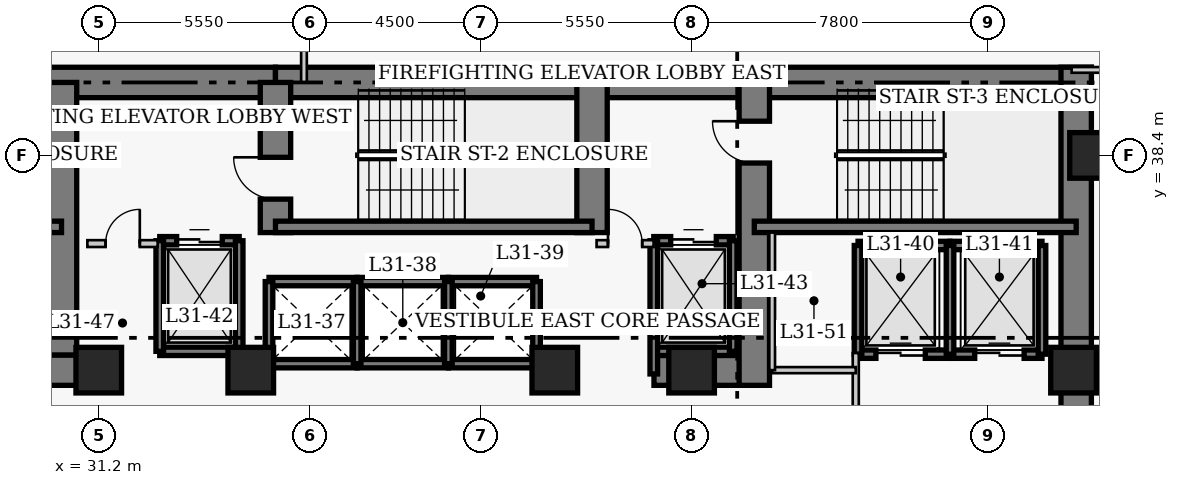
"""IFC4 building model, lengths in metres.
Left out: names, types, materials, properties, quantities, classifications, styles, units other than length and angle.
Written with IfcOpenShell. Run it as: python <this file> out.ifc"""

import sys

from ifc_helpers import new_model, si_unit, direction, frame, frame_2d, origin, origin_2d, place, context, subcontext, project, spatial, rectangle, extrude, element, fill, save


model = new_model("IFC4")
c1 = context("Model", 3, precision=1e-05, world=origin(), true_north=direction((0.0, 1.0)))
c2 = subcontext(c1, "Body", "Model", "MODEL_VIEW")
j1 = project(units=[si_unit("LENGTHUNIT", "METRE"), si_unit("PLANEANGLEUNIT", "RADIAN")], contexts=[c1])
p1 = place(None, origin())
s1 = spatial("IfcSite", under=j1, at=p1, CompositionType="ELEMENT")
p2 = place(p1, origin())
s2 = spatial("IfcBuilding", under=s1, at=p2, CompositionType="ELEMENT")
p3 = place(p2, frame((0.0, 0.0, 126.0)))
s3 = spatial("IfcBuildingStorey", under=s2, at=p3, CompositionType="ELEMENT", Elevation=126.0)
p4 = place(p3, frame((21.5, 40.32, 0.0), z_axis=(0.0, 0.0, 1.0), x_axis=(1.0, 0.0, 0.0)))
e1 = element("IfcWall", 1, at=p4, inside=s3, PredefinedType="SHEAR", context=c2, shape_type="SweptSolid", body=[
    extrude(rectangle(XDim=14.35, YDim=0.8, at=frame_2d((7.175, 0.0))), origin(), (0.0, 0.0, 1.0), 3.8),
])
p5 = place(p3, frame((35.85, 40.32, 0.0), z_axis=(0.0, 0.0, 1.0), x_axis=(1.0, 0.0, 0.0)))
e2 = element("IfcWall", 2, at=p5, inside=s3, PredefinedType="SHEAR", context=c2, shape_type="SweptSolid", body=[
    extrude(rectangle(XDim=12.6, YDim=0.8, at=frame_2d((6.3, 0.0))), origin(), (0.0, 0.0, 1.0), 3.8),
])
p6 = place(p3, frame((48.45, 40.32, 0.0), z_axis=(0.0, 0.0, 1.0), x_axis=(1.0, 0.0, 0.0)))
e3 = element("IfcWall", 3, at=p6, inside=s3, PredefinedType="SHEAR", context=c2, shape_type="SweptSolid", body=[
    extrude(rectangle(XDim=8.87, YDim=0.8, at=frame_2d((4.435, 0.0))), origin(), (0.0, 0.0, 1.0), 3.8),
])
p7 = place(p3, frame((56.92, 27.05, 0.0), z_axis=(0.0, 0.0, 1.0), x_axis=(0.0, 1.0, 0.0)))
e4 = element("IfcWall", 4, at=p7, inside=s3, PredefinedType="SHEAR", context=c2, shape_type="SweptSolid", body=[
    extrude(rectangle(XDim=13.67, YDim=0.8, at=frame_2d((6.835, 0.0))), origin(), (0.0, 0.0, 1.0), 3.8),
])
p8 = place(p3, frame((28.45, 32.75, 0.0), z_axis=(0.0, 0.0, 1.0), x_axis=(1.0, 0.0, 0.0)))
e5 = element("IfcWall", 5, at=p8, inside=s3, PredefinedType="SHEAR", context=c2, shape_type="SweptSolid", body=[
    extrude(rectangle(XDim=2.4, YDim=0.8, at=frame_2d((1.2, 0.0))), origin(), (0.0, 0.0, 1.0), 3.8),
])
p9 = place(p3, frame((45.81, 32.75, 0.0), z_axis=(0.0, 0.0, 1.0), x_axis=(1.0, 0.0, 0.0)))
e6 = element("IfcWall", 6, at=p9, inside=s3, PredefinedType="SHEAR", context=c2, shape_type="SweptSolid", body=[
    extrude(rectangle(XDim=2.64, YDim=0.8, at=frame_2d((1.32, 0.0))), origin(), (0.0, 0.0, 1.0), 3.8),
])
p10 = place(p3, frame((30.22, 33.15, 0.0), z_axis=(0.0, 0.0, 1.0), x_axis=(0.0, 1.0, 0.0)))
e7 = element("IfcWall", 7, at=p10, inside=s3, PredefinedType="SHEAR", context=c2, shape_type="SweptSolid", body=[
    extrude(rectangle(XDim=7.17, YDim=0.8, at=frame_2d((3.585, 0.0))), origin(), (0.0, 0.0, 1.0), 3.8),
])
p11 = place(p3, frame((35.85, 36.37, 0.0), z_axis=(0.0, 0.0, 1.0), x_axis=(0.0, 1.0, 0.0)))
e8 = element("IfcWall", 8, at=p11, inside=s3, PredefinedType="SHEAR", context=c2, shape_type="SweptSolid", body=[
    extrude(rectangle(XDim=3.95, YDim=0.8, at=frame_2d((1.975, 0.0))), origin(), (0.0, 0.0, 1.0), 3.8),
])
p12 = place(p11, frame((0.88, 0.0, 0.0)))
e9 = element("IfcOpeningElement", 9, at=p12, cuts=e8, PredefinedType="OPENING", context=c2, shape_type="SweptSolid", body=[
    extrude(rectangle(XDim=1.1, YDim=2.15, at=frame_2d((0.55, 1.075))), frame((0.0, 0.41, 0.0), z_axis=(0.0, -1.0, 0.0), x_axis=(1.0, 0.0, 0.0)), (0.0, 0.0, 1.0), 0.82),
])
p13 = place(p3, frame((44.18, 36.37, 0.0), z_axis=(0.0, 0.0, 1.0), x_axis=(0.0, 1.0, 0.0)))
e10 = element("IfcWall", 10, at=p13, inside=s3, PredefinedType="SHEAR", context=c2, shape_type="SweptSolid", body=[
    extrude(rectangle(XDim=3.95, YDim=0.8, at=frame_2d((1.975, 0.0))), origin(), (0.0, 0.0, 1.0), 3.8),
])
p14 = place(p3, frame((48.45, 32.35, 0.0), z_axis=(0.0, 0.0, 1.0), x_axis=(0.0, 1.0, 0.0)))
e11 = element("IfcWall", 11, at=p14, inside=s3, PredefinedType="SHEAR", context=c2, shape_type="SweptSolid", body=[
    extrude(rectangle(XDim=7.97, YDim=0.8, at=frame_2d((3.985, 0.0))), origin(), (0.0, 0.0, 1.0), 3.8),
])
p15 = place(p14, frame((5.85, 0.0, 0.0)))
e12 = element("IfcOpeningElement", 12, at=p15, cuts=e11, PredefinedType="OPENING", context=c2, shape_type="SweptSolid", body=[
    extrude(rectangle(XDim=1.1, YDim=2.15, at=frame_2d((0.55, 1.075))), frame((0.0, 0.41, 0.0), z_axis=(0.0, -1.0, 0.0), x_axis=(1.0, 0.0, 0.0)), (0.0, 0.0, 1.0), 0.82),
])
p16 = place(p3, frame((21.9, 36.52, 0.0), z_axis=(0.0, 0.0, 1.0), x_axis=(1.0, 0.0, 0.0)))
e13 = element("IfcWall", 13, at=p16, inside=s3, PredefinedType="SHEAR", context=c2, shape_type="SweptSolid", body=[
    extrude(rectangle(XDim=8.32, YDim=0.3, at=frame_2d((4.16, 0.0))), origin(), (0.0, 0.0, 1.0), 3.8),
])
p17 = place(p16, frame((0.9, 0.0, 0.0)))
e14 = element("IfcOpeningElement", 14, at=p17, cuts=e13, PredefinedType="OPENING", context=c2, shape_type="SweptSolid", body=[
    extrude(rectangle(XDim=1.1, YDim=2.15, at=frame_2d((0.55, 1.075))), frame((0.0, 0.16, 0.0), z_axis=(0.0, -1.0, 0.0), x_axis=(1.0, 0.0, 0.0)), (0.0, 0.0, 1.0), 0.32),
])
p18 = place(p3, frame((35.85, 36.52, 0.0), z_axis=(0.0, 0.0, 1.0), x_axis=(1.0, 0.0, 0.0)))
e15 = element("IfcWall", 15, at=p18, inside=s3, PredefinedType="SHEAR", context=c2, shape_type="SweptSolid", body=[
    extrude(rectangle(XDim=8.33, YDim=0.3, at=frame_2d((4.165, 0.0))), origin(), (0.0, 0.0, 1.0), 3.8),
])
p19 = place(p3, frame((48.45, 36.52, 0.0), z_axis=(0.0, 0.0, 1.0), x_axis=(1.0, 0.0, 0.0)))
e16 = element("IfcWall", 16, at=p19, inside=s3, PredefinedType="SHEAR", context=c2, shape_type="SweptSolid", body=[
    extrude(rectangle(XDim=8.47, YDim=0.3, at=frame_2d((4.235, 0.0))), origin(), (0.0, 0.0, 1.0), 3.8),
])
for number, where, z_axis, x_axis in (
    (17, (57.35, 38.4, 0.0), (0.0, 0.0, 1.0), (1.0, 0.0, 0.0)),
    (18, (31.2, 32.75, 0.0), (0.0, 0.0, 1.0), (1.0, 0.0, 0.0)),
    (19, (35.2, 32.75, 0.0), (0.0, 0.0, 1.0), (1.0, 0.0, 0.0)),
    (20, (43.2, 32.75, 0.0), (0.0, 0.0, 1.0), (1.0, 0.0, 0.0)),
    (21, (46.8, 32.75, 0.0), (0.0, 0.0, 1.0), (1.0, 0.0, 0.0)),
    (22, (56.85, 32.75, 0.0), (0.0, 0.0, 1.0), (1.0, 0.0, 0.0)),
):
    element("IfcColumn", number, at=place(p3, frame(where, z_axis=z_axis, x_axis=x_axis)), inside=s3, PredefinedType="COLUMN", context=c2, shape_type="SweptSolid", body=[
        extrude(rectangle(XDim=1.2, YDim=1.2, at=origin_2d()), origin(), (0.0, 0.0, 1.0), 3.8),
    ])
for number, where, z_axis, x_axis in (
    (23, (35.68, 35.08, 0.0), (0.0, 0.0, 1.0), (1.0, 0.0, 0.0)),
    (24, (35.68, 32.92, 0.0), (0.0, 0.0, 1.0), (1.0, 0.0, 0.0)),
):
    element("IfcWall", number, at=place(p3, frame(where, z_axis=z_axis, x_axis=x_axis)), inside=s3, PredefinedType="SHEAR", context=c2, shape_type="SweptSolid", body=[
        extrude(rectangle(XDim=2.32, YDim=0.22, at=frame_2d((1.16, 0.0))), origin(), (0.0, 0.0, 1.0), 3.8),
    ])
p20 = place(p3, frame((35.68, 32.92, 0.0), z_axis=(0.0, 0.0, 1.0), x_axis=(0.0, 1.0, 0.0)))
e25 = element("IfcWall", 25, at=p20, inside=s3, PredefinedType="SHEAR", context=c2, shape_type="SweptSolid", body=[
    extrude(rectangle(XDim=2.16, YDim=0.2, at=frame_2d((1.08, 0.0))), origin(), (0.0, 0.0, 1.0), 3.8),
])
for number, where, z_axis, x_axis in (
    (26, (38.0, 35.08, 0.0), (0.0, 0.0, 1.0), (1.0, 0.0, 0.0)),
    (27, (38.0, 32.92, 0.0), (0.0, 0.0, 1.0), (1.0, 0.0, 0.0)),
):
    element("IfcWall", number, at=place(p3, frame(where, z_axis=z_axis, x_axis=x_axis)), inside=s3, PredefinedType="SHEAR", context=c2, shape_type="SweptSolid", body=[
        extrude(rectangle(XDim=2.4, YDim=0.22, at=frame_2d((1.2, 0.0))), origin(), (0.0, 0.0, 1.0), 3.8),
    ])
p21 = place(p3, frame((38.0, 32.92, 0.0), z_axis=(0.0, 0.0, 1.0), x_axis=(0.0, 1.0, 0.0)))
e28 = element("IfcWall", 28, at=p21, inside=s3, PredefinedType="SHEAR", context=c2, shape_type="SweptSolid", body=[
    extrude(rectangle(XDim=2.16, YDim=0.2, at=frame_2d((1.08, 0.0))), origin(), (0.0, 0.0, 1.0), 3.8),
])
for number, where, z_axis, x_axis in (
    (29, (40.4, 35.08, 0.0), (0.0, 0.0, 1.0), (1.0, 0.0, 0.0)),
    (30, (40.4, 32.92, 0.0), (0.0, 0.0, 1.0), (1.0, 0.0, 0.0)),
):
    element("IfcWall", number, at=place(p3, frame(where, z_axis=z_axis, x_axis=x_axis)), inside=s3, PredefinedType="SHEAR", context=c2, shape_type="SweptSolid", body=[
        extrude(rectangle(XDim=2.32, YDim=0.22, at=frame_2d((1.16, 0.0))), origin(), (0.0, 0.0, 1.0), 3.8),
    ])
for number, where, z_axis, x_axis in (
    (31, (40.4, 32.92, 0.0), (0.0, 0.0, 1.0), (0.0, 1.0, 0.0)),
    (32, (42.72, 32.92, 0.0), (0.0, 0.0, 1.0), (0.0, 1.0, 0.0)),
):
    element("IfcWall", number, at=place(p3, frame(where, z_axis=z_axis, x_axis=x_axis)), inside=s3, PredefinedType="SHEAR", context=c2, shape_type="SweptSolid", body=[
        extrude(rectangle(XDim=2.16, YDim=0.2, at=frame_2d((1.08, 0.0))), origin(), (0.0, 0.0, 1.0), 3.8),
    ])
p22 = place(p3, frame((51.18, 36.03, 0.0), z_axis=(0.0, 0.0, 1.0), x_axis=(1.0, 0.0, 0.0)))
e33 = element("IfcWall", 33, at=p22, inside=s3, PredefinedType="SHEAR", context=c2, shape_type="SweptSolid", body=[
    extrude(rectangle(XDim=2.42, YDim=0.22, at=frame_2d((1.21, 0.0))), origin(), (0.0, 0.0, 1.0), 3.8),
])
p23 = place(p3, frame((51.18, 33.17, 0.0), z_axis=(0.0, 0.0, 1.0), x_axis=(1.0, 0.0, 0.0)))
e34 = element("IfcWall", 34, at=p23, inside=s3, PredefinedType="SHEAR", context=c2, shape_type="SweptSolid", body=[
    extrude(rectangle(XDim=2.42, YDim=0.22, at=frame_2d((1.21, 0.0))), origin(), (0.0, 0.0, 1.0), 3.8),
])
p24 = place(p23, frame((0.47, 0.0, 0.0)))
e35 = element("IfcOpeningElement", 35, at=p24, cuts=e34, PredefinedType="OPENING", context=c2, shape_type="SweptSolid", body=[
    extrude(rectangle(XDim=1.3, YDim=2.15, at=frame_2d((0.65, 1.075))), frame((0.0, 0.12, 0.0), z_axis=(0.0, -1.0, 0.0), x_axis=(1.0, 0.0, 0.0)), (0.0, 0.0, 1.0), 0.24),
])
p25 = place(p3, frame((51.18, 33.17, 0.0), z_axis=(0.0, 0.0, 1.0), x_axis=(0.0, 1.0, 0.0)))
e36 = element("IfcWall", 36, at=p25, inside=s3, PredefinedType="SHEAR", context=c2, shape_type="SweptSolid", body=[
    extrude(rectangle(XDim=2.86, YDim=0.2, at=frame_2d((1.43, 0.0))), origin(), (0.0, 0.0, 1.0), 3.8),
])
p26 = place(p3, frame((53.6, 36.03, 0.0), z_axis=(0.0, 0.0, 1.0), x_axis=(1.0, 0.0, 0.0)))
e37 = element("IfcWall", 37, at=p26, inside=s3, PredefinedType="SHEAR", context=c2, shape_type="SweptSolid", body=[
    extrude(rectangle(XDim=2.42, YDim=0.22, at=frame_2d((1.21, 0.0))), origin(), (0.0, 0.0, 1.0), 3.8),
])
p27 = place(p3, frame((53.6, 33.17, 0.0), z_axis=(0.0, 0.0, 1.0), x_axis=(1.0, 0.0, 0.0)))
e38 = element("IfcWall", 38, at=p27, inside=s3, PredefinedType="SHEAR", context=c2, shape_type="SweptSolid", body=[
    extrude(rectangle(XDim=2.42, YDim=0.22, at=frame_2d((1.21, 0.0))), origin(), (0.0, 0.0, 1.0), 3.8),
])
p28 = place(p27, frame((0.65, 0.0, 0.0)))
e39 = element("IfcOpeningElement", 39, at=p28, cuts=e38, PredefinedType="OPENING", context=c2, shape_type="SweptSolid", body=[
    extrude(rectangle(XDim=1.3, YDim=2.15, at=frame_2d((0.65, 1.075))), frame((0.0, 0.12, 0.0), z_axis=(0.0, -1.0, 0.0), x_axis=(1.0, 0.0, 0.0)), (0.0, 0.0, 1.0), 0.24),
])
for number, where, z_axis, x_axis in (
    (40, (53.6, 33.17, 0.0), (0.0, 0.0, 1.0), (0.0, 1.0, 0.0)),
    (41, (56.02, 33.17, 0.0), (0.0, 0.0, 1.0), (0.0, 1.0, 0.0)),
):
    element("IfcWall", number, at=place(p3, frame(where, z_axis=z_axis, x_axis=x_axis)), inside=s3, PredefinedType="SHEAR", context=c2, shape_type="SweptSolid", body=[
        extrude(rectangle(XDim=2.86, YDim=0.2, at=frame_2d((1.43, 0.0))), origin(), (0.0, 0.0, 1.0), 3.8),
    ])
p29 = place(p3, frame((32.805, 36.155, 0.0), z_axis=(0.0, 0.0, 1.0), x_axis=(1.0, 0.0, 0.0)))
e42 = element("IfcWall", 42, at=p29, inside=s3, PredefinedType="SHEAR", context=c2, shape_type="SweptSolid", body=[
    extrude(rectangle(XDim=2.09, YDim=0.22, at=frame_2d((1.045, 0.0))), origin(), (0.0, 0.0, 1.0), 3.8),
])
p30 = place(p29, frame((0.445, 0.0, 0.0)))
e43 = element("IfcOpeningElement", 43, at=p30, cuts=e42, PredefinedType="OPENING", context=c2, shape_type="SweptSolid", body=[
    extrude(rectangle(XDim=1.2, YDim=2.15, at=frame_2d((0.6, 1.075))), frame((0.0, 0.12, 0.0), z_axis=(0.0, -1.0, 0.0), x_axis=(1.0, 0.0, 0.0)), (0.0, 0.0, 1.0), 0.24),
])
p31 = place(p3, frame((32.805, 33.245, 0.0), z_axis=(0.0, 0.0, 1.0), x_axis=(1.0, 0.0, 0.0)))
e44 = element("IfcWall", 44, at=p31, inside=s3, PredefinedType="SHEAR", context=c2, shape_type="SweptSolid", body=[
    extrude(rectangle(XDim=2.09, YDim=0.22, at=frame_2d((1.045, 0.0))), origin(), (0.0, 0.0, 1.0), 3.8),
])
for number, where, z_axis, x_axis in (
    (45, (32.805, 33.245, 0.0), (0.0, 0.0, 1.0), (0.0, 1.0, 0.0)),
    (46, (34.895, 33.245, 0.0), (0.0, 0.0, 1.0), (0.0, 1.0, 0.0)),
):
    element("IfcWall", number, at=place(p3, frame(where, z_axis=z_axis, x_axis=x_axis)), inside=s3, PredefinedType="SHEAR", context=c2, shape_type="SweptSolid", body=[
        extrude(rectangle(XDim=2.91, YDim=0.2, at=frame_2d((1.455, 0.0))), origin(), (0.0, 0.0, 1.0), 3.8),
    ])
p32 = place(p3, frame((45.805, 36.155, 0.0), z_axis=(0.0, 0.0, 1.0), x_axis=(1.0, 0.0, 0.0)))
e47 = element("IfcWall", 47, at=p32, inside=s3, PredefinedType="SHEAR", context=c2, shape_type="SweptSolid", body=[
    extrude(rectangle(XDim=2.09, YDim=0.22, at=frame_2d((1.045, 0.0))), origin(), (0.0, 0.0, 1.0), 3.8),
])
p33 = place(p32, frame((0.445, 0.0, 0.0)))
e48 = element("IfcOpeningElement", 48, at=p33, cuts=e47, PredefinedType="OPENING", context=c2, shape_type="SweptSolid", body=[
    extrude(rectangle(XDim=1.2, YDim=2.15, at=frame_2d((0.6, 1.075))), frame((0.0, 0.12, 0.0), z_axis=(0.0, -1.0, 0.0), x_axis=(1.0, 0.0, 0.0)), (0.0, 0.0, 1.0), 0.24),
])
p34 = place(p3, frame((45.805, 33.245, 0.0), z_axis=(0.0, 0.0, 1.0), x_axis=(1.0, 0.0, 0.0)))
e49 = element("IfcWall", 49, at=p34, inside=s3, PredefinedType="SHEAR", context=c2, shape_type="SweptSolid", body=[
    extrude(rectangle(XDim=2.09, YDim=0.22, at=frame_2d((1.045, 0.0))), origin(), (0.0, 0.0, 1.0), 3.8),
])
p35 = place(p3, frame((45.805, 32.65, 0.0), z_axis=(0.0, 0.0, 1.0), x_axis=(0.0, 1.0, 0.0)))
e50 = element("IfcWall", 50, at=p35, inside=s3, PredefinedType="SHEAR", context=c2, shape_type="SweptSolid", body=[
    extrude(rectangle(XDim=3.505, YDim=0.2, at=frame_2d((1.752, 0.0))), origin(), (0.0, 0.0, 1.0), 3.8),
])
p36 = place(p3, frame((47.895, 33.245, 0.0), z_axis=(0.0, 0.0, 1.0), x_axis=(0.0, 1.0, 0.0)))
e51 = element("IfcWall", 51, at=p36, inside=s3, PredefinedType="SHEAR", context=c2, shape_type="SweptSolid", body=[
    extrude(rectangle(XDim=2.91, YDim=0.2, at=frame_2d((1.455, 0.0))), origin(), (0.0, 0.0, 1.0), 3.8),
])
p37 = place(p3, frame((30.9, 36.08, 0.0), z_axis=(0.0, 0.0, 1.0), x_axis=(1.0, 0.0, 0.0)))
e52 = element("IfcWall", 52, at=p37, inside=s3, PredefinedType="PARTITIONING", context=c2, shape_type="SweptSolid", body=[
    extrude(rectangle(XDim=1.85, YDim=0.18, at=frame_2d((0.925, 0.0))), origin(), (0.0, 0.0, 1.0), 3.46),
])
p38 = place(p37, frame((0.48, 0.0, 0.0)))
e53 = element("IfcOpeningElement", 53, at=p38, cuts=e52, PredefinedType="OPENING", context=c2, shape_type="SweptSolid", body=[
    extrude(rectangle(XDim=0.9, YDim=2.15, at=frame_2d((0.45, 1.075))), frame((0.0, 0.1, 0.0), z_axis=(0.0, -1.0, 0.0), x_axis=(1.0, 0.0, 0.0)), (0.0, 0.0, 1.0), 0.2),
])
p39 = place(p3, frame((44.3, 36.08, 0.0), z_axis=(0.0, 0.0, 1.0), x_axis=(1.0, 0.0, 0.0)))
e54 = element("IfcWall", 54, at=p39, inside=s3, PredefinedType="PARTITIONING", context=c2, shape_type="SweptSolid", body=[
    extrude(rectangle(XDim=1.5, YDim=0.18, at=frame_2d((0.75, 0.0))), origin(), (0.0, 0.0, 1.0), 3.46),
])
p40 = place(p39, frame((0.3, 0.0, 0.0)))
e55 = element("IfcOpeningElement", 55, at=p40, cuts=e54, PredefinedType="OPENING", context=c2, shape_type="SweptSolid", body=[
    extrude(rectangle(XDim=0.9, YDim=2.15, at=frame_2d((0.45, 1.075))), frame((0.0, 0.1, 0.0), z_axis=(0.0, -1.0, 0.0), x_axis=(1.0, 0.0, 0.0)), (0.0, 0.0, 1.0), 0.2),
])
p41 = place(p3, frame((51.12, 29.5, 0.0), z_axis=(0.0, 0.0, 1.0), x_axis=(0.0, 1.0, 0.0)))
e56 = element("IfcWall", 56, at=p41, inside=s3, PredefinedType="PARTITIONING", context=c2, shape_type="SweptSolid", body=[
    extrude(rectangle(XDim=3.7, YDim=0.16, at=frame_2d((1.85, 0.0))), origin(), (0.0, 0.0, 1.0), 3.46),
])
p42 = place(p41, frame((0.9, 0.0, 0.0)))
e57 = element("IfcOpeningElement", 57, at=p42, cuts=e56, PredefinedType="OPENING", context=c2, shape_type="SweptSolid", body=[
    extrude(rectangle(XDim=1.1, YDim=2.15, at=frame_2d((0.55, 1.075))), frame((0.0, 0.09, 0.0), z_axis=(0.0, -1.0, 0.0), x_axis=(1.0, 0.0, 0.0)), (0.0, 0.0, 1.0), 0.18),
])
p43 = place(p3, frame((48.92, 32.75, 0.0), z_axis=(0.0, 0.0, 1.0), x_axis=(1.0, 0.0, 0.0)))
e58 = element("IfcWall", 58, at=p43, inside=s3, PredefinedType="PARTITIONING", context=c2, shape_type="SweptSolid", body=[
    extrude(rectangle(XDim=2.2, YDim=0.16, at=frame_2d((1.1, 0.0))), origin(), (0.0, 0.0, 1.0), 3.46),
])
p44 = place(p3, frame((48.92, 32.75, 0.0), z_axis=(0.0, 0.0, 1.0), x_axis=(0.0, 1.0, 0.0)))
e59 = element("IfcWall", 59, at=p44, inside=s3, PredefinedType="PARTITIONING", context=c2, shape_type="SweptSolid", body=[
    extrude(rectangle(XDim=3.62, YDim=0.15, at=frame_2d((1.81, 0.0))), origin(), (0.0, 0.0, 1.0), 3.46),
])
p45 = place(p3, frame((56.8, 40.65, 0.0), z_axis=(0.0, 0.0, 1.0), x_axis=(1.0, 0.0, 0.0)))
e60 = element("IfcWall", 60, at=p45, inside=s3, PredefinedType="PARTITIONING", context=c2, shape_type="SweptSolid", body=[
    extrude(rectangle(XDim=4.36, YDim=0.15, at=frame_2d((2.18, 0.0))), origin(), (0.0, 0.0, 1.0), 3.46),
])
p46 = place(p45, frame((2.75, 0.0, 0.0)))
e61 = element("IfcOpeningElement", 61, at=p46, cuts=e60, PredefinedType="OPENING", context=c2, shape_type="SweptSolid", body=[
    extrude(rectangle(XDim=1.0, YDim=2.15, at=frame_2d((0.5, 1.075))), frame((0.0, 0.085, 0.0), z_axis=(0.0, -1.0, 0.0), x_axis=(1.0, 0.0, 0.0)), (0.0, 0.0, 1.0), 0.17),
])
p47 = place(p3, frame((36.6, 40.32, 0.0), z_axis=(0.0, 0.0, 1.0), x_axis=(0.0, 1.0, 0.0)))
e62 = element("IfcWall", 62, at=p47, inside=s3, PredefinedType="PARTITIONING", context=c2, shape_type="SweptSolid", body=[
    extrude(rectangle(XDim=3.445, YDim=0.15, at=frame_2d((1.723, 0.0))), origin(), (0.0, 0.0, 1.0), 3.46),
])
p48 = place(p24, origin())
e63 = element("IfcDoor", 63, at=p48, inside=s3, OperationType="DOUBLE_DOOR_SLIDING", PredefinedType="DOOR", context=c2, shape_type="SweptSolid", body=[
    extrude(rectangle(XDim=1.3, YDim=2.15, at=frame_2d((0.65, 1.075))), frame((0.0, 0.025, 0.0), z_axis=(0.0, -1.0, 0.0), x_axis=(1.0, 0.0, 0.0)), (0.0, 0.0, 1.0), 0.05),
])
fill(e35, e63)
p49 = place(p28, origin())
e64 = element("IfcDoor", 64, at=p49, inside=s3, OperationType="DOUBLE_DOOR_SLIDING", PredefinedType="DOOR", context=c2, shape_type="SweptSolid", body=[
    extrude(rectangle(XDim=1.3, YDim=2.15, at=frame_2d((0.65, 1.075))), frame((0.0, 0.025, 0.0), z_axis=(0.0, -1.0, 0.0), x_axis=(1.0, 0.0, 0.0)), (0.0, 0.0, 1.0), 0.05),
])
fill(e39, e64)
p50 = place(p30, origin())
e65 = element("IfcDoor", 65, at=p50, inside=s3, OperationType="DOUBLE_DOOR_SLIDING", PredefinedType="DOOR", context=c2, shape_type="SweptSolid", body=[
    extrude(rectangle(XDim=1.2, YDim=2.15, at=frame_2d((0.6, 1.075))), frame((0.0, 0.025, 0.0), z_axis=(0.0, -1.0, 0.0), x_axis=(1.0, 0.0, 0.0)), (0.0, 0.0, 1.0), 0.05),
])
fill(e43, e65)
p51 = place(p33, origin())
e66 = element("IfcDoor", 66, at=p51, inside=s3, OperationType="DOUBLE_DOOR_SLIDING", PredefinedType="DOOR", context=c2, shape_type="SweptSolid", body=[
    extrude(rectangle(XDim=1.2, YDim=2.15, at=frame_2d((0.6, 1.075))), frame((0.0, 0.025, 0.0), z_axis=(0.0, -1.0, 0.0), x_axis=(1.0, 0.0, 0.0)), (0.0, 0.0, 1.0), 0.05),
])
fill(e48, e66)
p52 = place(p38, origin())
e67 = element("IfcDoor", 67, at=p52, inside=s3, OperationType="SINGLE_SWING_RIGHT", PredefinedType="DOOR", context=c2, shape_type="SweptSolid", body=[
    extrude(rectangle(XDim=0.9, YDim=2.15, at=frame_2d((0.45, 1.075))), frame((0.0, 0.025, 0.0), z_axis=(0.0, -1.0, 0.0), x_axis=(1.0, 0.0, 0.0)), (0.0, 0.0, 1.0), 0.05),
])
fill(e53, e67)
p53 = place(p40, origin())
e68 = element("IfcDoor", 68, at=p53, inside=s3, OperationType="SINGLE_SWING_LEFT", PredefinedType="DOOR", context=c2, shape_type="SweptSolid", body=[
    extrude(rectangle(XDim=0.9, YDim=2.15, at=frame_2d((0.45, 1.075))), frame((0.0, 0.025, 0.0), z_axis=(0.0, -1.0, 0.0), x_axis=(1.0, 0.0, 0.0)), (0.0, 0.0, 1.0), 0.05),
])
fill(e55, e68)
p54 = place(p12, origin())
e69 = element("IfcDoor", 69, at=p54, inside=s3, OperationType="SINGLE_SWING_RIGHT", PredefinedType="DOOR", context=c2, shape_type="SweptSolid", body=[
    extrude(rectangle(XDim=1.1, YDim=2.15, at=frame_2d((0.55, 1.075))), frame((0.0, 0.025, 0.0), z_axis=(0.0, -1.0, 0.0), x_axis=(1.0, 0.0, 0.0)), (0.0, 0.0, 1.0), 0.05),
])
fill(e9, e69)
p55 = place(p15, origin())
e70 = element("IfcDoor", 70, at=p55, inside=s3, OperationType="SINGLE_SWING_RIGHT", PredefinedType="DOOR", context=c2, shape_type="SweptSolid", body=[
    extrude(rectangle(XDim=1.1, YDim=2.15, at=frame_2d((0.55, 1.075))), frame((0.0, 0.025, 0.0), z_axis=(0.0, -1.0, 0.0), x_axis=(1.0, 0.0, 0.0)), (0.0, 0.0, 1.0), 0.05),
])
fill(e12, e70)
save(model, sys.argv[1])
